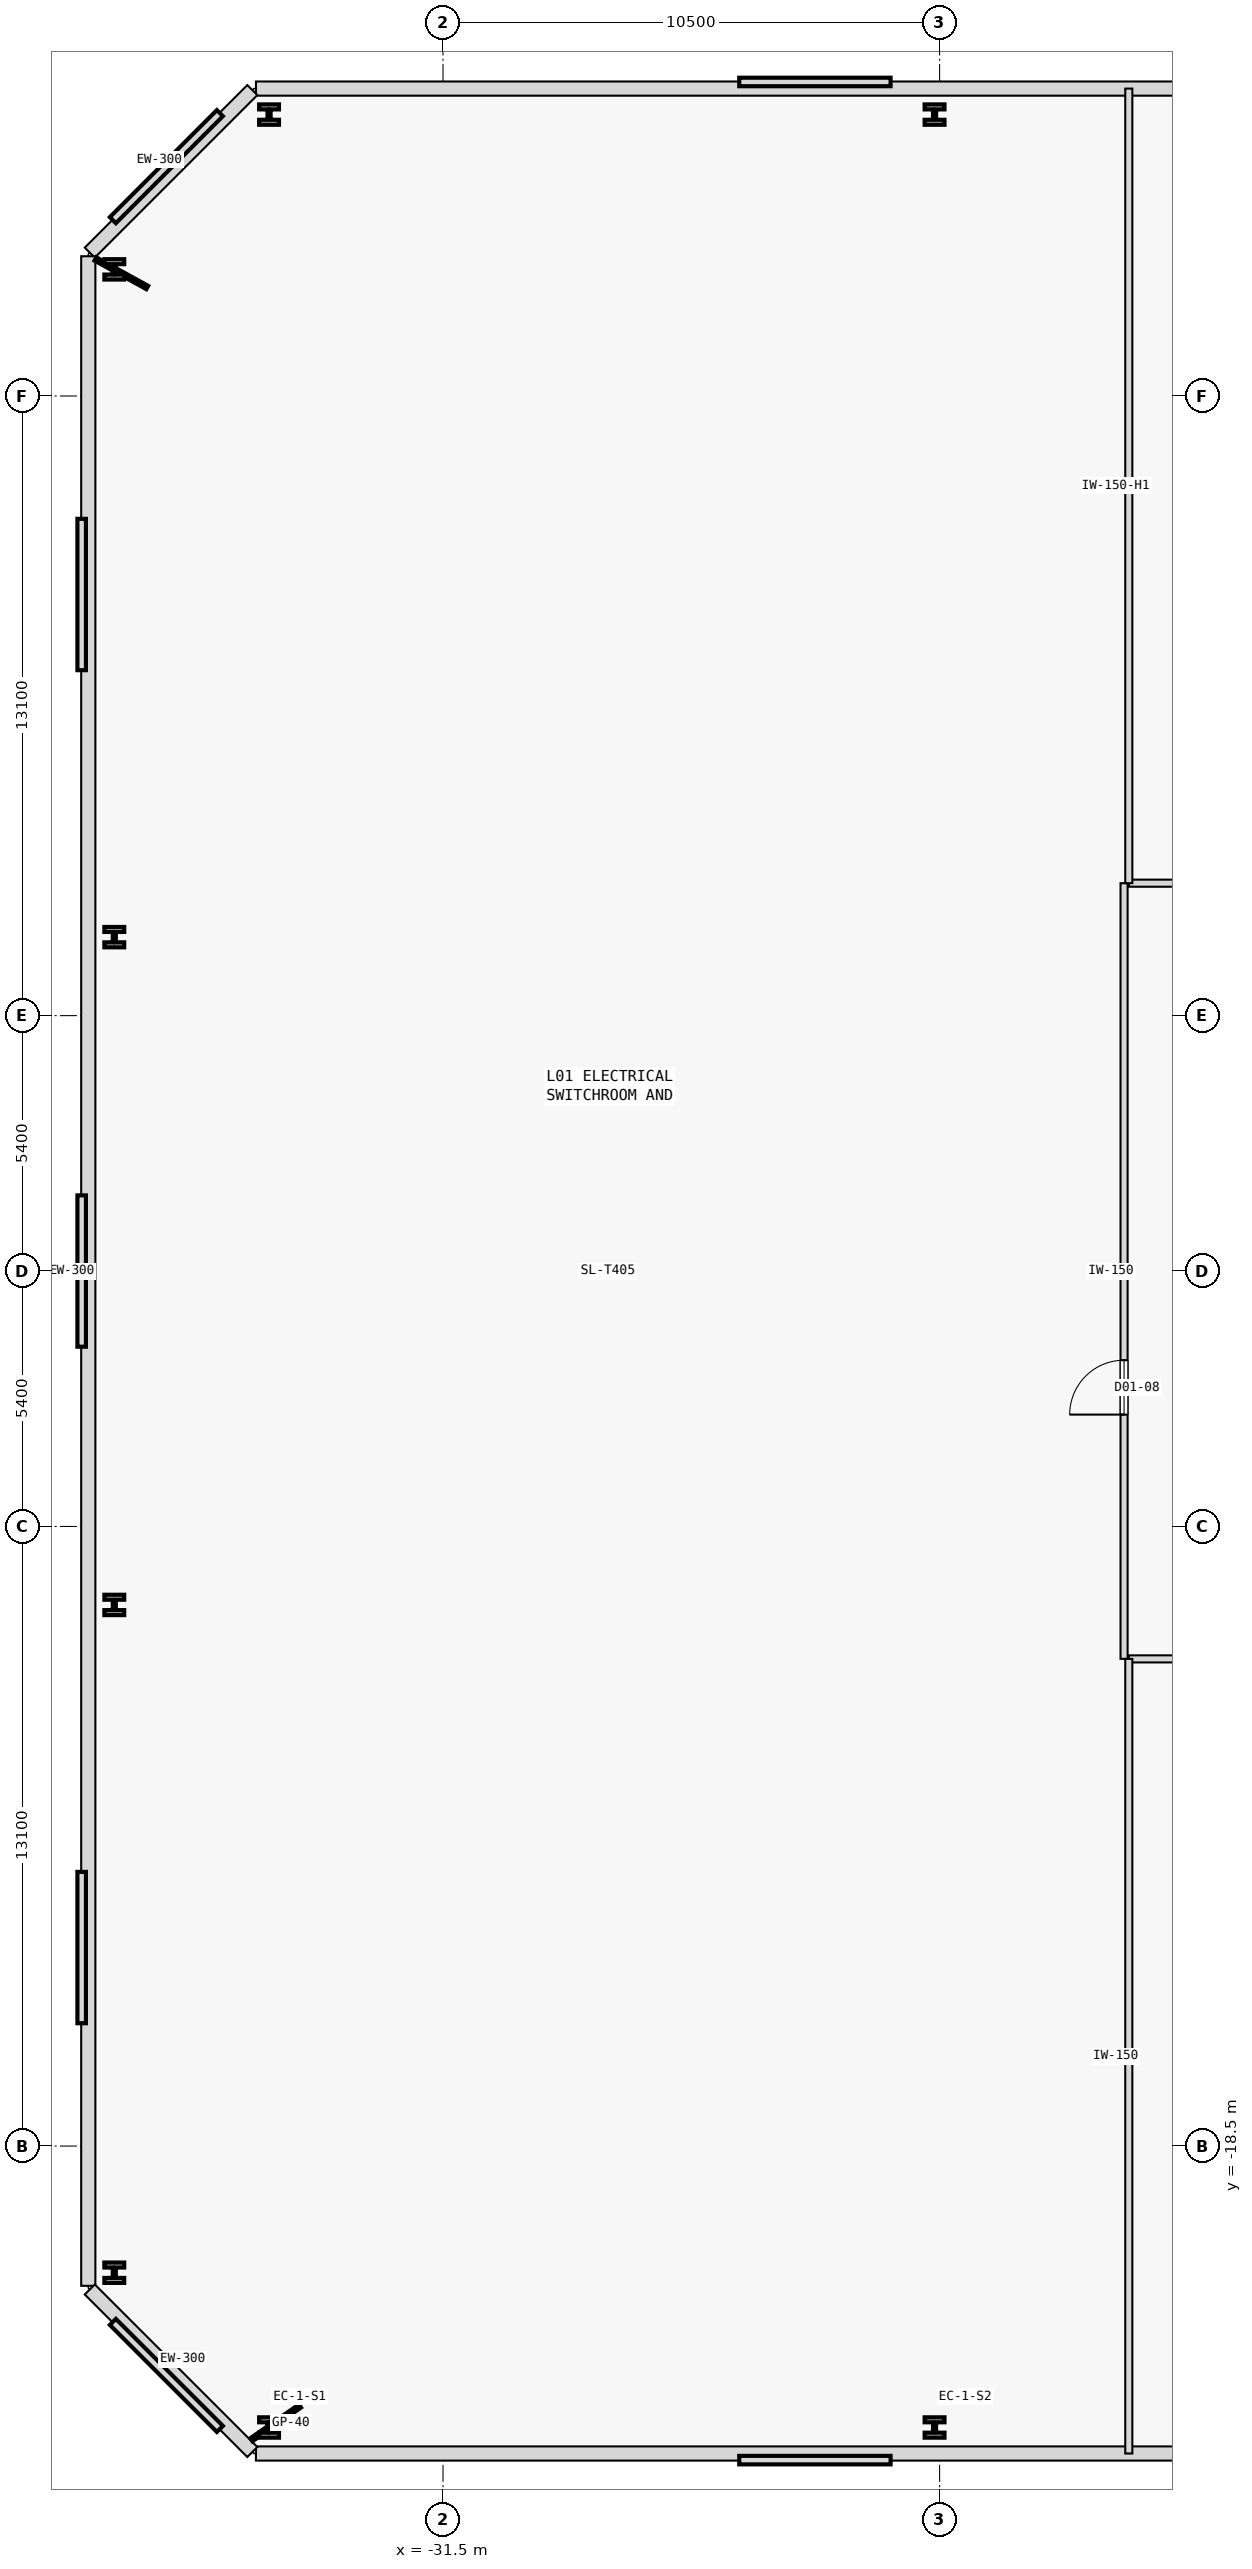
"""IFC4 building model, lengths in metres.
Left out: names, types, materials, properties, quantities, classifications, styles, units other than length and angle.
Written with IfcOpenShell. Run it as: python <this file> out.ifc"""

import sys

from ifc_helpers import new_model, si_unit, direction, frame, frame_2d, origin, origin_2d, place, context, subcontext, project, spatial, rectangle, i_section, extrude, element, fill, save


model = new_model("IFC4")
c1 = context("Model", 3, precision=1e-05, world=origin(), true_north=direction((0.0, 1.0)))
c2 = subcontext(c1, "Body", "Model", "MODEL_VIEW")
j1 = project(units=[si_unit("LENGTHUNIT", "METRE"), si_unit("PLANEANGLEUNIT", "RADIAN")], contexts=[c1])
p1 = place(None, origin())
s1 = spatial("IfcSite", under=j1, at=p1, CompositionType="ELEMENT")
p2 = place(p1, origin())
s2 = spatial("IfcBuilding", under=s1, at=p2, CompositionType="ELEMENT")
p3 = place(p2, frame((0.0, 0.0, 9.6)))
s3 = spatial("IfcBuildingStorey", under=s2, at=p3, CompositionType="ELEMENT", Elevation=9.6)
for number, where, z_axis, x_axis in (
    (1, (-35.178, -24.45, 0.0), (0.0, 0.0, 1.0), (1.0, 0.0, 0.0)),
    (2, (-21.107, -24.45, 0.0), (0.0, 0.0, 1.0), (1.0, 0.0, 0.0)),
    (3, (-21.107, 24.45, 0.0), (0.0, 0.0, 1.0), (1.0, 0.0, 0.0)),
    (4, (-35.178, 24.45, 0.0), (0.0, 0.0, 1.0), (1.0, 0.0, 0.0)),
    (5, (-38.45, 21.178, 0.0), (0.0, 0.0, 1.0), (1.0, 0.0, 0.0)),
    (6, (-38.45, 7.059, 0.0), (0.0, 0.0, 1.0), (1.0, 0.0, 0.0)),
    (7, (-38.45, -7.059, 0.0), (0.0, 0.0, 1.0), (1.0, 0.0, 0.0)),
    (8, (-38.45, -21.178, 0.0), (0.0, 0.0, 1.0), (1.0, 0.0, 0.0)),
):
    element("IfcColumn", number, at=place(p3, frame(where, z_axis=z_axis, x_axis=x_axis)), inside=s3, PredefinedType="COLUMN", context=c2, shape_type="SweptSolid", body=[
        extrude(i_section(OverallWidth=0.42, OverallDepth=0.431, WebThickness=0.065, FlangeThickness=0.106, FilletRadius=0.015, at=origin_2d()), origin(), (0.0, 0.0, 1.0), 4.6),
    ])
for number, where, z_axis, x_axis in (
    (9, (-35.455, -25.0, 0.0), (0.0, 0.0, 1.0), (1.0, 0.0, 0.0)),
    (10, (35.455, 25.0, 0.0), (0.0, 0.0, 1.0), (-1.0, 0.0, 0.0)),
):
    element("IfcWall", number, at=place(p3, frame(where, z_axis=z_axis, x_axis=x_axis)), inside=s3, PredefinedType="STANDARD", context=c2, shape_type="SweptSolid", body=[
        extrude(rectangle(XDim=70.91, YDim=0.3, at=frame_2d((35.455, 0.0))), origin(), (0.0, 0.0, 1.0), 4.375),
    ])
p4 = place(p3, frame((-35.532, 24.968, 0.0), z_axis=(0.0, 0.0, 1.0), x_axis=(-0.707106781187, -0.707106781187, 0.0)))
e11 = element("IfcWall", 11, at=p4, inside=s3, PredefinedType="STANDARD", context=c2, shape_type="SweptSolid", body=[
    extrude(rectangle(XDim=4.86, YDim=0.3, at=frame_2d((2.43, 0.0))), origin(), (0.0, 0.0, 1.0), 4.375),
])
p5 = place(p3, frame((-39.0, 21.455, 0.0), z_axis=(0.0, 0.0, 1.0), x_axis=(0.0, -1.0, 0.0)))
e12 = element("IfcWall", 12, at=p5, inside=s3, PredefinedType="STANDARD", context=c2, shape_type="SweptSolid", body=[
    extrude(rectangle(XDim=42.91, YDim=0.3, at=frame_2d((21.455, 0.0))), origin(), (0.0, 0.0, 1.0), 4.375),
])
p6 = place(p3, frame((-38.968, -21.532, 0.0), z_axis=(0.0, 0.0, 1.0), x_axis=(0.707106781187, -0.707106781187, 0.0)))
e13 = element("IfcWall", 13, at=p6, inside=s3, PredefinedType="STANDARD", context=c2, shape_type="SweptSolid", body=[
    extrude(rectangle(XDim=4.86, YDim=0.3, at=frame_2d((2.43, 0.0))), origin(), (0.0, 0.0, 1.0), 4.375),
])
p7 = place(p3, frame((-17.0, 8.2, 0.0), z_axis=(0.0, 0.0, 1.0), x_axis=(1.0, 0.0, 0.0)))
e14 = element("IfcWall", 14, at=p7, inside=s3, PredefinedType="PARTITIONING", context=c2, shape_type="SweptSolid", body=[
    extrude(rectangle(XDim=15.0, YDim=0.15, at=frame_2d((7.5, 0.0))), origin(), (0.0, 0.0, 1.0), 4.375),
])
p8 = place(p7, frame((6.925, 0.0, 0.0)))
e15 = element("IfcOpeningElement", 15, at=p8, cuts=e14, PredefinedType="OPENING", context=c2, shape_type="SweptSolid", body=[
    extrude(rectangle(XDim=1.15, YDim=2.15, at=frame_2d((0.575, 1.075))), frame((0.0, 0.085, 0.0), z_axis=(0.0, -1.0, 0.0), x_axis=(1.0, 0.0, 0.0)), (0.0, 0.0, 1.0), 0.17),
])
p9 = place(p3, frame((-17.0, -8.2, 0.0), z_axis=(0.0, 0.0, 1.0), x_axis=(1.0, 0.0, 0.0)))
e16 = element("IfcWall", 16, at=p9, inside=s3, PredefinedType="PARTITIONING", context=c2, shape_type="SweptSolid", body=[
    extrude(rectangle(XDim=19.5, YDim=0.15, at=frame_2d((9.75, 0.0))), origin(), (0.0, 0.0, 1.0), 4.375),
])
p10 = place(p9, frame((9.175, 0.0, 0.0)))
e17 = element("IfcOpeningElement", 17, at=p10, cuts=e16, PredefinedType="OPENING", context=c2, shape_type="SweptSolid", body=[
    extrude(rectangle(XDim=1.15, YDim=2.15, at=frame_2d((0.575, 1.075))), frame((0.0, 0.085, 0.0), z_axis=(0.0, -1.0, 0.0), x_axis=(1.0, 0.0, 0.0)), (0.0, 0.0, 1.0), 0.17),
])
p11 = place(p3, frame((-17.1, -8.2, 0.0), z_axis=(0.0, 0.0, 1.0), x_axis=(0.0, 1.0, 0.0)))
e18 = element("IfcWall", 18, at=p11, inside=s3, PredefinedType="PARTITIONING", context=c2, shape_type="SweptSolid", body=[
    extrude(rectangle(XDim=16.4, YDim=0.15, at=frame_2d((8.2, 0.0))), origin(), (0.0, 0.0, 1.0), 4.375),
])
p12 = place(p11, frame((5.165, 0.0, 0.0)))
e19 = element("IfcOpeningElement", 19, at=p12, cuts=e18, PredefinedType="OPENING", context=c2, shape_type="SweptSolid", body=[
    extrude(rectangle(XDim=1.15, YDim=2.15, at=frame_2d((0.575, 1.075))), frame((0.0, 0.085, 0.0), z_axis=(0.0, -1.0, 0.0), x_axis=(1.0, 0.0, 0.0)), (0.0, 0.0, 1.0), 0.17),
])
p13 = place(p3, frame((-17.0, 8.2, 0.0), z_axis=(0.0, 0.0, 1.0), x_axis=(0.0, 1.0, 0.0)))
e20 = element("IfcWall", 20, at=p13, inside=s3, PredefinedType="PARTITIONING", context=c2, shape_type="SweptSolid", body=[
    extrude(rectangle(XDim=16.8, YDim=0.15, at=frame_2d((8.4, 0.0))), origin(), (0.0, 0.0, 1.0), 3.925),
])
p14 = place(p3, frame((-17.0, -25.0, 0.0), z_axis=(0.0, 0.0, 1.0), x_axis=(0.0, 1.0, 0.0)))
e21 = element("IfcWall", 21, at=p14, inside=s3, PredefinedType="PARTITIONING", context=c2, shape_type="SweptSolid", body=[
    extrude(rectangle(XDim=16.8, YDim=0.15, at=frame_2d((8.4, 0.0))), origin(), (0.0, 0.0, 1.0), 4.375),
])
p15 = place(p12, origin())
e22 = element("IfcDoor", 22, at=p15, inside=s3, OperationType="SINGLE_SWING_LEFT", PredefinedType="DOOR", context=c2, shape_type="SweptSolid", body=[
    extrude(rectangle(XDim=1.15, YDim=2.15, at=frame_2d((0.575, 1.075))), frame((0.0, 0.025, 0.0), z_axis=(0.0, -1.0, 0.0), x_axis=(1.0, 0.0, 0.0)), (0.0, 0.0, 1.0), 0.05),
])
fill(e19, e22)
save(model, sys.argv[1])
